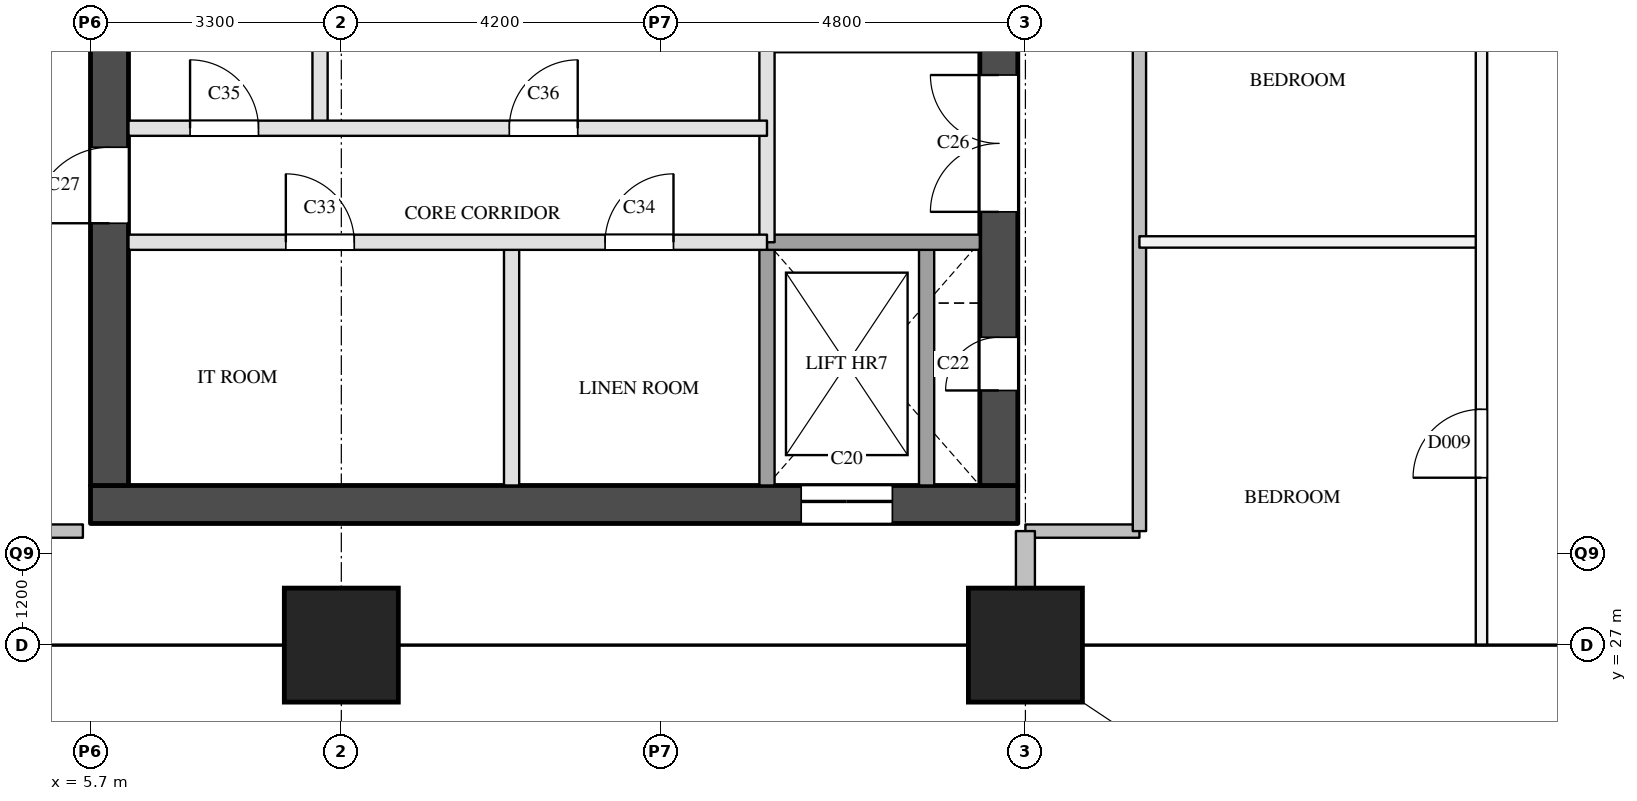
"""IFC4 building model, lengths in metres.
Left out: names, types, materials, properties, quantities, classifications, styles, units other than length and angle.
Written with IfcOpenShell. Run it as: python <this file> out.ifc"""

import sys

from ifc_helpers import new_model, si_unit, direction, frame, frame_2d, origin, origin_2d, place, context, subcontext, project, spatial, rectangle, extrude, element, fill, save


model = new_model("IFC4")
c1 = context("Model", 3, precision=1e-05, world=origin(), true_north=direction((0.0, 1.0)))
c2 = subcontext(c1, "Body", "Model", "MODEL_VIEW")
j1 = project(units=[si_unit("LENGTHUNIT", "METRE"), si_unit("PLANEANGLEUNIT", "RADIAN")], contexts=[c1])
p1 = place(None, origin())
s1 = spatial("IfcSite", under=j1, at=p1, CompositionType="ELEMENT")
p2 = place(p1, origin())
s2 = spatial("IfcBuilding", under=s1, at=p2, CompositionType="ELEMENT")
p3 = place(p2, frame((0.0, 0.0, 150.5)))
s3 = spatial("IfcBuildingStorey", under=s2, at=p3, CompositionType="ELEMENT", Elevation=150.5)
for number, where, z_axis, x_axis in (
    (1, (9.0, 27.0, 0.0), (0.0, 0.0, 1.0), (1.0, 0.0, 0.0)),
    (2, (18.0, 27.0, 0.0), (0.0, 0.0, 1.0), (1.0, 0.0, 0.0)),
):
    element("IfcColumn", number, at=place(p3, frame(where, z_axis=z_axis, x_axis=x_axis)), inside=s3, PredefinedType="COLUMN", context=c2, shape_type="SweptSolid", body=[
        extrude(rectangle(XDim=1.5, YDim=1.5, at=origin_2d()), origin(), (0.0, 0.0, 1.0), 3.9),
    ])
p4 = place(p3, frame((5.7, 28.85, 0.0), z_axis=(0.0, 0.0, 1.0), x_axis=(1.0, 0.0, 0.0)))
e3 = element("IfcWall", 3, at=p4, inside=s3, PredefinedType="SHEAR", context=c2, shape_type="SweptSolid", body=[
    extrude(rectangle(XDim=12.2, YDim=0.5, at=frame_2d((6.1, 0.0))), origin(), (0.0, 0.0, 1.0), 3.6),
])
p5 = place(p4, frame((9.35, 0.0, 0.0)))
e4 = element("IfcOpeningElement", 4, at=p5, cuts=e3, PredefinedType="OPENING", context=c2, shape_type="SweptSolid", body=[
    extrude(rectangle(XDim=1.2, YDim=2.1, at=frame_2d((0.6, 1.05))), frame((0.0, 0.26, 0.0), z_axis=(0.0, -1.0, 0.0), x_axis=(1.0, 0.0, 0.0)), (0.0, 0.0, 1.0), 0.52),
])
p6 = place(p3, frame((5.95, 29.1, 0.0), z_axis=(0.0, 0.0, 1.0), x_axis=(0.0, 1.0, 0.0)))
e5 = element("IfcWall", 5, at=p6, inside=s3, PredefinedType="SHEAR", context=c2, shape_type="SweptSolid", body=[
    extrude(rectangle(XDim=20.3, YDim=0.5, at=frame_2d((10.15, 0.0))), origin(), (0.0, 0.0, 1.0), 3.6),
])
p7 = place(p6, frame((3.45, 0.0, 0.0)))
e6 = element("IfcOpeningElement", 6, at=p7, cuts=e5, PredefinedType="OPENING", context=c2, shape_type="SweptSolid", body=[
    extrude(rectangle(XDim=1.0, YDim=2.1, at=frame_2d((0.5, 1.05))), frame((0.0, 0.26, 0.0), z_axis=(0.0, -1.0, 0.0), x_axis=(1.0, 0.0, 0.0)), (0.0, 0.0, 1.0), 0.52),
])
p8 = place(p6, frame((16.4, 0.0, 0.0)))
e7 = element("IfcOpeningElement", 7, at=p8, cuts=e5, PredefinedType="OPENING", context=c2, shape_type="SweptSolid", body=[
    extrude(rectangle(XDim=1.0, YDim=2.1, at=frame_2d((0.5, 1.05))), frame((0.0, 0.26, 0.0), z_axis=(0.0, -1.0, 0.0), x_axis=(1.0, 0.0, 0.0)), (0.0, 0.0, 1.0), 0.52),
])
p9 = place(p3, frame((17.65, 29.1, 0.0), z_axis=(0.0, 0.0, 1.0), x_axis=(0.0, 1.0, 0.0)))
e8 = element("IfcWall", 8, at=p9, inside=s3, PredefinedType="SHEAR", context=c2, shape_type="SweptSolid", body=[
    extrude(rectangle(XDim=20.3, YDim=0.5, at=frame_2d((10.15, 0.0))), origin(), (0.0, 0.0, 1.0), 3.6),
])
p10 = place(p9, frame((1.25, 0.0, 0.0)))
e9 = element("IfcOpeningElement", 9, at=p10, cuts=e8, PredefinedType="OPENING", context=c2, shape_type="SweptSolid", body=[
    extrude(rectangle(XDim=0.7, YDim=2.1, at=frame_2d((0.35, 1.05))), frame((0.0, 0.26, 0.0), z_axis=(0.0, -1.0, 0.0), x_axis=(1.0, 0.0, 0.0)), (0.0, 0.0, 1.0), 0.52),
])
p11 = place(p9, frame((7.05, 0.0, 0.0)))
e10 = element("IfcOpeningElement", 10, at=p11, cuts=e8, PredefinedType="OPENING", context=c2, shape_type="SweptSolid", body=[
    extrude(rectangle(XDim=0.7, YDim=2.1, at=frame_2d((0.35, 1.05))), frame((0.0, 0.26, 0.0), z_axis=(0.0, -1.0, 0.0), x_axis=(1.0, 0.0, 0.0)), (0.0, 0.0, 1.0), 0.52),
])
p12 = place(p9, frame((3.6, 0.0, 0.0)))
e11 = element("IfcOpeningElement", 11, at=p12, cuts=e8, PredefinedType="OPENING", context=c2, shape_type="SweptSolid", body=[
    extrude(rectangle(XDim=1.8, YDim=2.1, at=frame_2d((0.9, 1.05))), frame((0.0, 0.26, 0.0), z_axis=(0.0, -1.0, 0.0), x_axis=(1.0, 0.0, 0.0)), (0.0, 0.0, 1.0), 0.52),
])
p13 = place(p3, frame((8.72, 33.8, 0.0), z_axis=(0.0, 0.0, 1.0), x_axis=(0.0, 1.0, 0.0)))
e12 = element("IfcWall", 12, at=p13, inside=s3, PredefinedType="PARTITIONING", context=c2, shape_type="SweptSolid", body=[
    extrude(rectangle(XDim=4.3, YDim=0.2, at=frame_2d((2.15, 0.0))), origin(), (0.0, 0.0, 1.0), 3.6),
])
p14 = place(p3, frame((11.24, 29.1, 0.0), z_axis=(0.0, 0.0, 1.0), x_axis=(0.0, 1.0, 0.0)))
e13 = element("IfcWall", 13, at=p14, inside=s3, PredefinedType="PARTITIONING", context=c2, shape_type="SweptSolid", body=[
    extrude(rectangle(XDim=3.2, YDim=0.2, at=frame_2d((1.6, 0.0))), origin(), (0.0, 0.0, 1.0), 3.6),
])
p15 = place(p3, frame((14.6, 32.3, 0.0), z_axis=(0.0, 0.0, 1.0), x_axis=(0.0, 1.0, 0.0)))
e14 = element("IfcWall", 14, at=p15, inside=s3, PredefinedType="PARTITIONING", context=c2, shape_type="SweptSolid", body=[
    extrude(rectangle(XDim=2.6, YDim=0.2, at=frame_2d((1.3, 0.0))), origin(), (0.0, 0.0, 1.0), 3.6),
])
for number, where, z_axis, x_axis in (
    (15, (14.6, 29.1, 0.0), (0.0, 0.0, 1.0), (0.0, 1.0, 0.0)),
    (16, (16.7, 29.1, 0.0), (0.0, 0.0, 1.0), (0.0, 1.0, 0.0)),
):
    element("IfcWall", number, at=place(p3, frame(where, z_axis=z_axis, x_axis=x_axis)), inside=s3, PredefinedType="SOLIDWALL", context=c2, shape_type="SweptSolid", body=[
        extrude(rectangle(XDim=3.2, YDim=0.2, at=frame_2d((1.6, 0.0))), origin(), (0.0, 0.0, 1.0), 3.6),
    ])
p16 = place(p3, frame((6.2, 32.3, 0.0), z_axis=(0.0, 0.0, 1.0), x_axis=(1.0, 0.0, 0.0)))
e17 = element("IfcWall", 17, at=p16, inside=s3, PredefinedType="PARTITIONING", context=c2, shape_type="SweptSolid", body=[
    extrude(rectangle(XDim=8.4, YDim=0.2, at=frame_2d((4.2, 0.0))), origin(), (0.0, 0.0, 1.0), 3.6),
])
p17 = place(p16, frame((2.07, 0.0, 0.0)))
e18 = element("IfcOpeningElement", 18, at=p17, cuts=e17, PredefinedType="OPENING", context=c2, shape_type="SweptSolid", body=[
    extrude(rectangle(XDim=0.9, YDim=2.1, at=frame_2d((0.45, 1.05))), frame((0.0, 0.11, 0.0), z_axis=(0.0, -1.0, 0.0), x_axis=(1.0, 0.0, 0.0)), (0.0, 0.0, 1.0), 0.22),
])
p18 = place(p16, frame((6.27, 0.0, 0.0)))
e19 = element("IfcOpeningElement", 19, at=p18, cuts=e17, PredefinedType="OPENING", context=c2, shape_type="SweptSolid", body=[
    extrude(rectangle(XDim=0.9, YDim=2.1, at=frame_2d((0.45, 1.05))), frame((0.0, 0.11, 0.0), z_axis=(0.0, -1.0, 0.0), x_axis=(1.0, 0.0, 0.0)), (0.0, 0.0, 1.0), 0.22),
])
p19 = place(p3, frame((14.6, 32.3, 0.0), z_axis=(0.0, 0.0, 1.0), x_axis=(1.0, 0.0, 0.0)))
e20 = element("IfcWall", 20, at=p19, inside=s3, PredefinedType="SOLIDWALL", context=c2, shape_type="SweptSolid", body=[
    extrude(rectangle(XDim=2.8, YDim=0.2, at=frame_2d((1.4, 0.0))), origin(), (0.0, 0.0, 1.0), 3.6),
])
p20 = place(p3, frame((6.2, 33.8, 0.0), z_axis=(0.0, 0.0, 1.0), x_axis=(1.0, 0.0, 0.0)))
e21 = element("IfcWall", 21, at=p20, inside=s3, PredefinedType="PARTITIONING", context=c2, shape_type="SweptSolid", body=[
    extrude(rectangle(XDim=8.4, YDim=0.2, at=frame_2d((4.2, 0.0))), origin(), (0.0, 0.0, 1.0), 3.6),
])
p21 = place(p20, frame((0.81, 0.0, 0.0)))
e22 = element("IfcOpeningElement", 22, at=p21, cuts=e21, PredefinedType="OPENING", context=c2, shape_type="SweptSolid", body=[
    extrude(rectangle(XDim=0.9, YDim=2.1, at=frame_2d((0.45, 1.05))), frame((0.0, 0.11, 0.0), z_axis=(0.0, -1.0, 0.0), x_axis=(1.0, 0.0, 0.0)), (0.0, 0.0, 1.0), 0.22),
])
p22 = place(p20, frame((5.01, 0.0, 0.0)))
e23 = element("IfcOpeningElement", 23, at=p22, cuts=e21, PredefinedType="OPENING", context=c2, shape_type="SweptSolid", body=[
    extrude(rectangle(XDim=0.9, YDim=2.1, at=frame_2d((0.45, 1.05))), frame((0.0, 0.11, 0.0), z_axis=(0.0, -1.0, 0.0), x_axis=(1.0, 0.0, 0.0)), (0.0, 0.0, 1.0), 0.22),
])
p23 = place(p3, frame((14.6, 34.9, 0.0), z_axis=(0.0, 0.0, 1.0), x_axis=(1.0, 0.0, 0.0)))
e24 = element("IfcWall", 24, at=p23, inside=s3, PredefinedType="SOLIDWALL", context=c2, shape_type="SweptSolid", body=[
    extrude(rectangle(XDim=2.8, YDim=0.2, at=frame_2d((1.4, 0.0))), origin(), (0.0, 0.0, 1.0), 3.6),
])
for number, where, z_axis, x_axis in (
    (25, (4.1, 28.5, 0.0), (0.0, 0.0, 1.0), (1.0, 0.0, 0.0)),
    (26, (18.0, 28.5, 0.0), (0.0, 0.0, 1.0), (1.0, 0.0, 0.0)),
):
    element("IfcWall", number, at=place(p3, frame(where, z_axis=z_axis, x_axis=x_axis)), inside=s3, PredefinedType="PARTITIONING", context=c2, shape_type="SweptSolid", body=[
        extrude(rectangle(XDim=1.5, YDim=0.175, at=frame_2d((0.75, 0.0))), origin(), (0.0, 0.0, 1.0), 3.6),
    ])
p24 = place(p3, frame((19.5, 28.5, 0.0), z_axis=(0.0, 0.0, 1.0), x_axis=(0.0, 1.0, 0.0)))
e27 = element("IfcWall", 27, at=p24, inside=s3, PredefinedType="PARTITIONING", context=c2, shape_type="SweptSolid", body=[
    extrude(rectangle(XDim=12.75, YDim=0.175, at=frame_2d((6.375, 0.0))), origin(), (0.0, 0.0, 1.0), 3.6),
])
p25 = place(p3, frame((19.5, 32.304, 0.0), z_axis=(0.0, 0.0, 1.0), x_axis=(1.0, 0.0, 0.0)))
e28 = element("IfcWall", 28, at=p25, inside=s3, PredefinedType="PARTITIONING", context=c2, shape_type="SweptSolid", body=[
    extrude(rectangle(XDim=4.5, YDim=0.15, at=frame_2d((2.25, 0.0))), origin(), (0.0, 0.0, 1.0), 3.6),
])
p26 = place(p3, frame((24.0, 27.0, 0.0), z_axis=(0.0, 0.0, 1.0), x_axis=(0.0, 1.0, 0.0)))
e29 = element("IfcWall", 29, at=p26, inside=s3, PredefinedType="PARTITIONING", context=c2, shape_type="SweptSolid", body=[
    extrude(rectangle(XDim=11.85, YDim=0.15, at=frame_2d((5.925, 0.0))), origin(), (0.0, 0.0, 1.0), 2.6),
])
p27 = place(p26, frame((8.127, 0.0, 0.0)))
e30 = element("IfcOpeningElement", 30, at=p27, cuts=e29, PredefinedType="OPENING", context=c2, shape_type="SweptSolid", body=[
    extrude(rectangle(XDim=0.9, YDim=2.1, at=frame_2d((0.45, 1.05))), frame((0.0, 0.085, 0.0), z_axis=(0.0, -1.0, 0.0), x_axis=(1.0, 0.0, 0.0)), (0.0, 0.0, 1.0), 0.17),
])
p28 = place(p26, frame((2.202, 0.0, 0.0)))
e31 = element("IfcOpeningElement", 31, at=p28, cuts=e29, PredefinedType="OPENING", context=c2, shape_type="SweptSolid", body=[
    extrude(rectangle(XDim=0.9, YDim=2.1, at=frame_2d((0.45, 1.05))), frame((0.0, 0.085, 0.0), z_axis=(0.0, -1.0, 0.0), x_axis=(1.0, 0.0, 0.0)), (0.0, 0.0, 1.0), 0.17),
])
p29 = place(p3, frame((18.0, 27.0, 0.0), z_axis=(0.0, 0.0, 1.0), x_axis=(0.0, 1.0, 0.0)))
e32 = element("IfcWall", 32, at=p29, inside=s3, PredefinedType="PARTITIONING", context=c2, shape_type="SweptSolid", body=[
    extrude(rectangle(XDim=1.5, YDim=0.25, at=frame_2d((0.75, 0.0))), origin(), (0.0, 0.0, 1.0), 3.6),
])
p30 = place(p5, origin())
e33 = element("IfcDoor", 33, at=p30, inside=s3, OperationType="SLIDING_TO_LEFT", PredefinedType="DOOR", context=c2, shape_type="SweptSolid", body=[
    extrude(rectangle(XDim=1.2, YDim=2.1, at=frame_2d((0.6, 1.05))), frame((0.0, 0.025, 0.0), z_axis=(0.0, -1.0, 0.0), x_axis=(1.0, 0.0, 0.0)), (0.0, 0.0, 1.0), 0.05),
])
fill(e4, e33)
p31 = place(p10, origin())
e34 = element("IfcDoor", 34, at=p31, inside=s3, OperationType="SINGLE_SWING_LEFT", PredefinedType="DOOR", context=c2, shape_type="SweptSolid", body=[
    extrude(rectangle(XDim=0.7, YDim=2.1, at=frame_2d((0.35, 1.05))), frame((0.0, 0.025, 0.0), z_axis=(0.0, -1.0, 0.0), x_axis=(1.0, 0.0, 0.0)), (0.0, 0.0, 1.0), 0.05),
])
fill(e9, e34)
p32 = place(p12, origin())
e35 = element("IfcDoor", 35, at=p32, inside=s3, OperationType="DOUBLE_DOOR_SINGLE_SWING", PredefinedType="DOOR", context=c2, shape_type="SweptSolid", body=[
    extrude(rectangle(XDim=1.8, YDim=2.1, at=frame_2d((0.9, 1.05))), frame((0.0, 0.025, 0.0), z_axis=(0.0, -1.0, 0.0), x_axis=(1.0, 0.0, 0.0)), (0.0, 0.0, 1.0), 0.05),
])
fill(e11, e35)
p33 = place(p7, origin())
e36 = element("IfcDoor", 36, at=p33, inside=s3, OperationType="SINGLE_SWING_LEFT", PredefinedType="DOOR", context=c2, shape_type="SweptSolid", body=[
    extrude(rectangle(XDim=1.0, YDim=2.1, at=frame_2d((0.5, 1.05))), frame((0.0, 0.025, 0.0), z_axis=(0.0, -1.0, 0.0), x_axis=(1.0, 0.0, 0.0)), (0.0, 0.0, 1.0), 0.05),
])
fill(e6, e36)
p34 = place(p17, origin())
e37 = element("IfcDoor", 37, at=p34, inside=s3, OperationType="SINGLE_SWING_LEFT", PredefinedType="DOOR", context=c2, shape_type="SweptSolid", body=[
    extrude(rectangle(XDim=0.9, YDim=2.1, at=frame_2d((0.45, 1.05))), frame((0.0, 0.025, 0.0), z_axis=(0.0, -1.0, 0.0), x_axis=(1.0, 0.0, 0.0)), (0.0, 0.0, 1.0), 0.05),
])
fill(e18, e37)
p35 = place(p18, origin())
e38 = element("IfcDoor", 38, at=p35, inside=s3, OperationType="SINGLE_SWING_RIGHT", PredefinedType="DOOR", context=c2, shape_type="SweptSolid", body=[
    extrude(rectangle(XDim=0.9, YDim=2.1, at=frame_2d((0.45, 1.05))), frame((0.0, 0.025, 0.0), z_axis=(0.0, -1.0, 0.0), x_axis=(1.0, 0.0, 0.0)), (0.0, 0.0, 1.0), 0.05),
])
fill(e19, e38)
p36 = place(p21, origin())
e39 = element("IfcDoor", 39, at=p36, inside=s3, OperationType="SINGLE_SWING_LEFT", PredefinedType="DOOR", context=c2, shape_type="SweptSolid", body=[
    extrude(rectangle(XDim=0.9, YDim=2.1, at=frame_2d((0.45, 1.05))), frame((0.0, 0.025, 0.0), z_axis=(0.0, -1.0, 0.0), x_axis=(1.0, 0.0, 0.0)), (0.0, 0.0, 1.0), 0.05),
])
fill(e22, e39)
p37 = place(p22, origin())
e40 = element("IfcDoor", 40, at=p37, inside=s3, OperationType="SINGLE_SWING_RIGHT", PredefinedType="DOOR", context=c2, shape_type="SweptSolid", body=[
    extrude(rectangle(XDim=0.9, YDim=2.1, at=frame_2d((0.45, 1.05))), frame((0.0, 0.025, 0.0), z_axis=(0.0, -1.0, 0.0), x_axis=(1.0, 0.0, 0.0)), (0.0, 0.0, 1.0), 0.05),
])
fill(e23, e40)
p38 = place(p28, origin())
e41 = element("IfcDoor", 41, at=p38, inside=s3, OperationType="SINGLE_SWING_LEFT", PredefinedType="DOOR", context=c2, shape_type="SweptSolid", body=[
    extrude(rectangle(XDim=0.9, YDim=2.1, at=frame_2d((0.45, 1.05))), frame((0.0, 0.025, 0.0), z_axis=(0.0, -1.0, 0.0), x_axis=(1.0, 0.0, 0.0)), (0.0, 0.0, 1.0), 0.05),
])
fill(e31, e41)
save(model, sys.argv[1])
